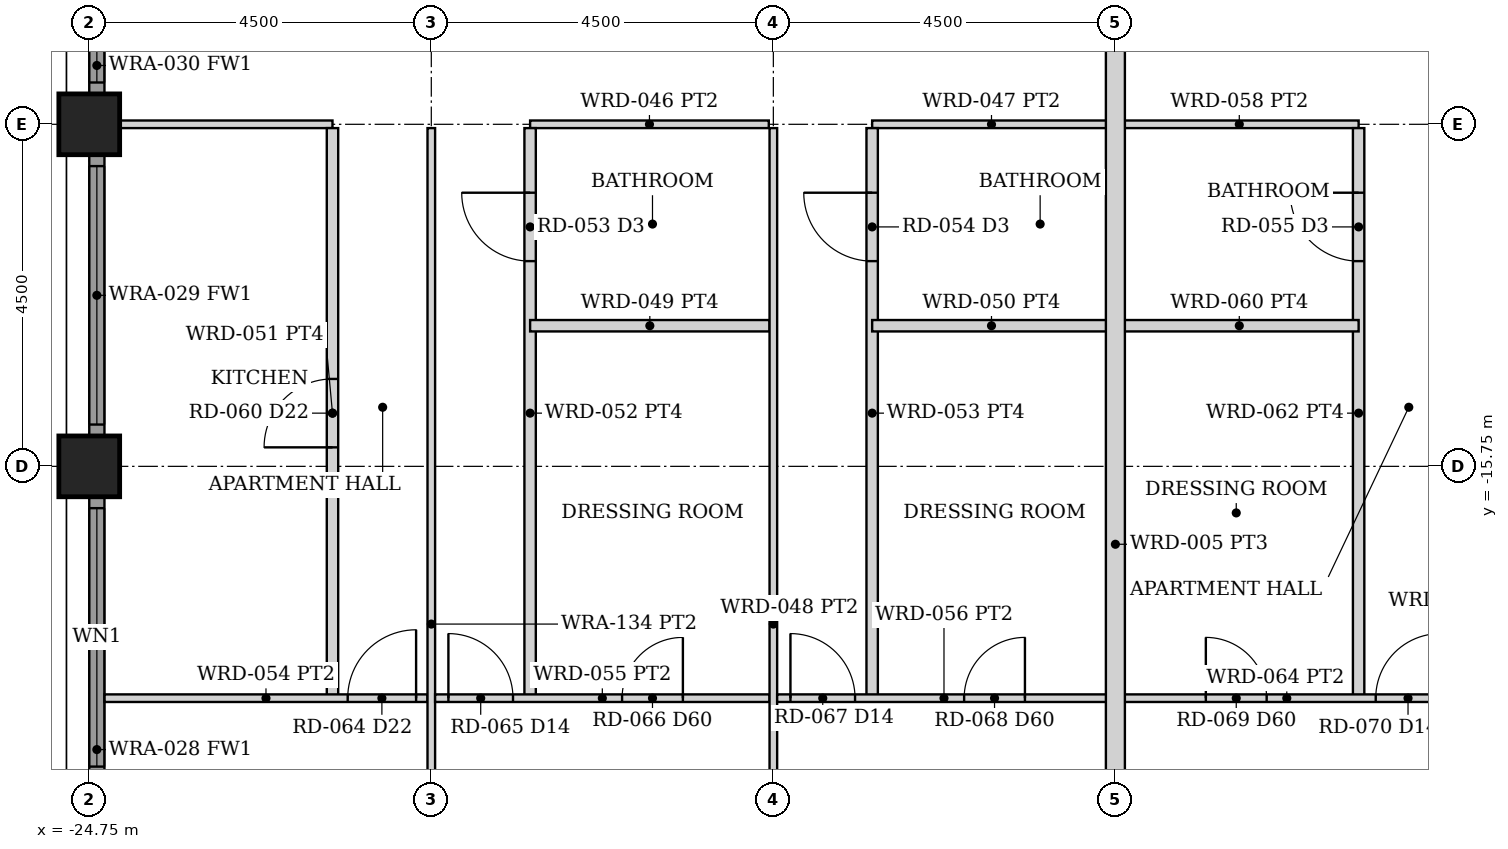
"""IFC4 building model, lengths in metres.
Left out: names, types, materials, properties, quantities, classifications, styles, units other than length and angle.
Written with IfcOpenShell. Run it as: python <this file> out.ifc"""

import sys

from ifc_helpers import new_model, si_unit, direction, frame, frame_2d, origin, origin_2d, place, context, subcontext, project, spatial, rectangle, hollow_rectangle, extrude, element, fill, save


model = new_model("IFC4")
c1 = context("Model", 3, precision=1e-05, world=origin(), true_north=direction((0.0, 1.0)))
c2 = subcontext(c1, "Body", "Model", "MODEL_VIEW")
j1 = project(units=[si_unit("LENGTHUNIT", "METRE"), si_unit("PLANEANGLEUNIT", "RADIAN")], contexts=[c1])
p1 = place(None, origin())
s1 = spatial("IfcSite", under=j1, at=p1, CompositionType="ELEMENT")
p2 = place(p1, origin())
s2 = spatial("IfcBuilding", under=s1, at=p2, CompositionType="ELEMENT")
p3 = place(p2, frame((0.0, 0.0, 58.0)))
s3 = spatial("IfcBuildingStorey", under=s2, at=p3, CompositionType="ELEMENT", Elevation=58.0)
for number, where, z_axis, x_axis in (
    (1, (-24.75, -15.75, 0.0), (0.0, 0.0, 1.0), (1.0, 0.0, 0.0)),
    (2, (-24.75, -11.25, 0.0), (0.0, 0.0, 1.0), (1.0, 0.0, 0.0)),
):
    element("IfcColumn", number, at=place(p3, frame(where, z_axis=z_axis, x_axis=x_axis)), inside=s3, PredefinedType="COLUMN", context=c2, shape_type="SweptSolid", body=[
        extrude(hollow_rectangle(XDim=0.8, YDim=0.8, WallThickness=0.06, at=origin_2d()), origin(), (0.0, 0.0, 1.0), 3.5),
    ])
p4 = place(p3, frame((-24.65, -19.845, 0.0), z_axis=(0.0, 0.0, 1.0), x_axis=(0.0, 1.0, 0.0)))
e3 = element("IfcWall", 3, at=p4, inside=s3, PredefinedType="SOLIDWALL", context=c2, shape_type="SweptSolid", body=[
    extrude(rectangle(XDim=3.69, YDim=0.2, at=frame_2d((1.845, 0.0))), origin(), (0.0, 0.0, 1.0), 2.379),
])
p5 = place(p4, frame((0.145, 0.0, 0.3)))
e4 = element("IfcOpeningElement", 4, at=p5, cuts=e3, PredefinedType="OPENING", context=c2, shape_type="SweptSolid", body=[
    extrude(rectangle(XDim=3.4, YDim=1.929, at=frame_2d((1.7, 0.964))), frame((0.0, 0.11, 0.0), z_axis=(0.0, -1.0, 0.0), x_axis=(1.0, 0.0, 0.0)), (0.0, 0.0, 1.0), 0.22),
])
p6 = place(p3, frame((-24.65, -15.345, 0.0), z_axis=(0.0, 0.0, 1.0), x_axis=(0.0, 1.0, 0.0)))
e5 = element("IfcWall", 5, at=p6, inside=s3, PredefinedType="SOLIDWALL", context=c2, shape_type="SweptSolid", body=[
    extrude(rectangle(XDim=3.69, YDim=0.2, at=frame_2d((1.845, 0.0))), origin(), (0.0, 0.0, 1.0), 2.379),
])
p7 = place(p6, frame((0.145, 0.0, 0.3)))
e6 = element("IfcOpeningElement", 6, at=p7, cuts=e5, PredefinedType="OPENING", context=c2, shape_type="SweptSolid", body=[
    extrude(rectangle(XDim=3.4, YDim=1.929, at=frame_2d((1.7, 0.964))), frame((0.0, 0.11, 0.0), z_axis=(0.0, -1.0, 0.0), x_axis=(1.0, 0.0, 0.0)), (0.0, 0.0, 1.0), 0.22),
])
p8 = place(p3, frame((-24.65, -10.845, 0.0), z_axis=(0.0, 0.0, 1.0), x_axis=(0.0, 1.0, 0.0)))
e7 = element("IfcWall", 7, at=p8, inside=s3, PredefinedType="SOLIDWALL", context=c2, shape_type="SweptSolid", body=[
    extrude(rectangle(XDim=3.69, YDim=0.2, at=frame_2d((1.845, 0.0))), origin(), (0.0, 0.0, 1.0), 2.379),
])
p9 = place(p8, frame((0.145, 0.0, 0.3)))
e8 = element("IfcOpeningElement", 8, at=p9, cuts=e7, PredefinedType="OPENING", context=c2, shape_type="SweptSolid", body=[
    extrude(rectangle(XDim=3.4, YDim=1.929, at=frame_2d((1.7, 0.964))), frame((0.0, 0.11, 0.0), z_axis=(0.0, -1.0, 0.0), x_axis=(1.0, 0.0, 0.0)), (0.0, 0.0, 1.0), 0.22),
])
p10 = place(p3, frame((-24.35, -11.25, 0.0), z_axis=(0.0, 0.0, 1.0), x_axis=(1.0, 0.0, 0.0)))
e9 = element("IfcWall", 9, at=p10, inside=s3, PredefinedType="PARTITIONING", context=c2, shape_type="SweptSolid", body=[
    extrude(rectangle(XDim=2.8, YDim=0.1, at=frame_2d((1.4, 0.0))), origin(), (0.0, 0.0, 1.0), 2.373),
])
p11 = place(p3, frame((-21.55, -18.8, 0.0), z_axis=(0.0, 0.0, 1.0), x_axis=(0.0, 1.0, 0.0)))
e10 = element("IfcWall", 10, at=p11, inside=s3, PredefinedType="PARTITIONING", context=c2, shape_type="SweptSolid", body=[
    extrude(rectangle(XDim=7.5, YDim=0.15, at=frame_2d((3.75, 0.0))), origin(), (0.0, 0.0, 1.0), 2.373),
])
p12 = place(p11, frame((3.3, 0.0, 0.0)))
e11 = element("IfcOpeningElement", 11, at=p12, cuts=e10, PredefinedType="OPENING", context=c2, shape_type="SweptSolid", body=[
    extrude(rectangle(XDim=0.9, YDim=2.1, at=frame_2d((0.45, 1.05))), frame((0.0, 0.085, 0.0), z_axis=(0.0, -1.0, 0.0), x_axis=(1.0, 0.0, 0.0)), (0.0, 0.0, 1.0), 0.17),
])
p13 = place(p3, frame((-24.55, -18.8, 0.0), z_axis=(0.0, 0.0, 1.0), x_axis=(1.0, 0.0, 0.0)))
e12 = element("IfcWall", 12, at=p13, inside=s3, PredefinedType="PARTITIONING", context=c2, shape_type="SweptSolid", body=[
    extrude(rectangle(XDim=4.25, YDim=0.1, at=frame_2d((2.125, 0.0))), origin(), (0.0, 0.0, 1.0), 2.373),
])
p14 = place(p13, frame((3.2, 0.0, 0.0)))
e13 = element("IfcOpeningElement", 13, at=p14, cuts=e12, PredefinedType="OPENING", context=c2, shape_type="SweptSolid", body=[
    extrude(rectangle(XDim=0.9, YDim=2.1, at=frame_2d((0.45, 1.05))), frame((0.0, 0.06, 0.0), z_axis=(0.0, -1.0, 0.0), x_axis=(1.0, 0.0, 0.0)), (0.0, 0.0, 1.0), 0.12),
])
p15 = place(p3, frame((-20.25, -24.35, 0.0), z_axis=(0.0, 0.0, 1.0), x_axis=(0.0, 1.0, 0.0)))
e14 = element("IfcWall", 14, at=p15, inside=s3, PredefinedType="PARTITIONING", context=c2, shape_type="SweptSolid", body=[
    extrude(rectangle(XDim=13.05, YDim=0.1, at=frame_2d((6.525, 0.0))), origin(), (0.0, 0.0, 1.0), 2.373),
])
p16 = place(p3, frame((-18.95, -11.25, 0.0), z_axis=(0.0, 0.0, 1.0), x_axis=(1.0, 0.0, 0.0)))
e15 = element("IfcWall", 15, at=p16, inside=s3, PredefinedType="PARTITIONING", context=c2, shape_type="SweptSolid", body=[
    extrude(rectangle(XDim=3.14, YDim=0.1, at=frame_2d((1.57, 0.0))), origin(), (0.0, 0.0, 1.0), 2.373),
])
p17 = place(p3, frame((-18.95, -18.8, 0.0), z_axis=(0.0, 0.0, 1.0), x_axis=(0.0, 1.0, 0.0)))
e16 = element("IfcWall", 16, at=p17, inside=s3, PredefinedType="PARTITIONING", context=c2, shape_type="SweptSolid", body=[
    extrude(rectangle(XDim=7.5, YDim=0.15, at=frame_2d((3.75, 0.0))), origin(), (0.0, 0.0, 1.0), 2.373),
])
p18 = place(p17, frame((5.75, 0.0, 0.0)))
e17 = element("IfcOpeningElement", 17, at=p18, cuts=e16, PredefinedType="OPENING", context=c2, shape_type="SweptSolid", body=[
    extrude(rectangle(XDim=0.9, YDim=2.1, at=frame_2d((0.45, 1.05))), frame((0.0, 0.085, 0.0), z_axis=(0.0, -1.0, 0.0), x_axis=(1.0, 0.0, 0.0)), (0.0, 0.0, 1.0), 0.17),
])
p19 = place(p3, frame((-20.2, -18.8, 0.0), z_axis=(0.0, 0.0, 1.0), x_axis=(1.0, 0.0, 0.0)))
e18 = element("IfcWall", 18, at=p19, inside=s3, PredefinedType="PARTITIONING", context=c2, shape_type="SweptSolid", body=[
    extrude(rectangle(XDim=4.4, YDim=0.1, at=frame_2d((2.2, 0.0))), origin(), (0.0, 0.0, 1.0), 2.373),
])
p20 = place(p19, frame((0.175, 0.0, 0.0)))
e19 = element("IfcOpeningElement", 19, at=p20, cuts=e18, PredefinedType="OPENING", context=c2, shape_type="SweptSolid", body=[
    extrude(rectangle(XDim=0.85, YDim=2.1, at=frame_2d((0.425, 1.05))), frame((0.0, 0.06, 0.0), z_axis=(0.0, -1.0, 0.0), x_axis=(1.0, 0.0, 0.0)), (0.0, 0.0, 1.0), 0.12),
])
p21 = place(p19, frame((2.46, 0.0, 0.0)))
e20 = element("IfcOpeningElement", 20, at=p21, cuts=e18, PredefinedType="OPENING", context=c2, shape_type="SweptSolid", body=[
    extrude(rectangle(XDim=0.8, YDim=2.1, at=frame_2d((0.4, 1.05))), frame((0.0, 0.06, 0.0), z_axis=(0.0, -1.0, 0.0), x_axis=(1.0, 0.0, 0.0)), (0.0, 0.0, 1.0), 0.12),
])
p22 = place(p3, frame((-18.95, -13.9, 0.0), z_axis=(0.0, 0.0, 1.0), x_axis=(1.0, 0.0, 0.0)))
e21 = element("IfcWall", 21, at=p22, inside=s3, PredefinedType="PARTITIONING", context=c2, shape_type="SweptSolid", body=[
    extrude(rectangle(XDim=3.15, YDim=0.15, at=frame_2d((1.575, 0.0))), origin(), (0.0, 0.0, 1.0), 2.373),
])
p23 = place(p3, frame((-15.75, -24.35, 0.0), z_axis=(0.0, 0.0, 1.0), x_axis=(0.0, 1.0, 0.0)))
e22 = element("IfcWall", 22, at=p23, inside=s3, PredefinedType="PARTITIONING", context=c2, shape_type="SweptSolid", body=[
    extrude(rectangle(XDim=13.05, YDim=0.1, at=frame_2d((6.525, 0.0))), origin(), (0.0, 0.0, 1.0), 2.373),
])
p24 = place(p3, frame((-14.45, -11.25, 0.0), z_axis=(0.0, 0.0, 1.0), x_axis=(1.0, 0.0, 0.0)))
e23 = element("IfcWall", 23, at=p24, inside=s3, PredefinedType="PARTITIONING", context=c2, shape_type="SweptSolid", body=[
    extrude(rectangle(XDim=3.14, YDim=0.1, at=frame_2d((1.57, 0.0))), origin(), (0.0, 0.0, 1.0), 2.373),
])
p25 = place(p3, frame((-14.45, -18.8, 0.0), z_axis=(0.0, 0.0, 1.0), x_axis=(0.0, 1.0, 0.0)))
e24 = element("IfcWall", 24, at=p25, inside=s3, PredefinedType="PARTITIONING", context=c2, shape_type="SweptSolid", body=[
    extrude(rectangle(XDim=7.5, YDim=0.15, at=frame_2d((3.75, 0.0))), origin(), (0.0, 0.0, 1.0), 2.373),
])
p26 = place(p25, frame((5.75, 0.0, 0.0)))
e25 = element("IfcOpeningElement", 25, at=p26, cuts=e24, PredefinedType="OPENING", context=c2, shape_type="SweptSolid", body=[
    extrude(rectangle(XDim=0.9, YDim=2.1, at=frame_2d((0.45, 1.05))), frame((0.0, 0.085, 0.0), z_axis=(0.0, -1.0, 0.0), x_axis=(1.0, 0.0, 0.0)), (0.0, 0.0, 1.0), 0.17),
])
p27 = place(p3, frame((-15.7, -18.8, 0.0), z_axis=(0.0, 0.0, 1.0), x_axis=(1.0, 0.0, 0.0)))
e26 = element("IfcWall", 26, at=p27, inside=s3, PredefinedType="PARTITIONING", context=c2, shape_type="SweptSolid", body=[
    extrude(rectangle(XDim=4.39, YDim=0.1, at=frame_2d((2.195, 0.0))), origin(), (0.0, 0.0, 1.0), 2.373),
])
p28 = place(p27, frame((0.175, 0.0, 0.0)))
e27 = element("IfcOpeningElement", 27, at=p28, cuts=e26, PredefinedType="OPENING", context=c2, shape_type="SweptSolid", body=[
    extrude(rectangle(XDim=0.85, YDim=2.1, at=frame_2d((0.425, 1.05))), frame((0.0, 0.06, 0.0), z_axis=(0.0, -1.0, 0.0), x_axis=(1.0, 0.0, 0.0)), (0.0, 0.0, 1.0), 0.12),
])
p29 = place(p27, frame((2.46, 0.0, 0.0)))
e28 = element("IfcOpeningElement", 28, at=p29, cuts=e26, PredefinedType="OPENING", context=c2, shape_type="SweptSolid", body=[
    extrude(rectangle(XDim=0.8, YDim=2.1, at=frame_2d((0.4, 1.05))), frame((0.0, 0.06, 0.0), z_axis=(0.0, -1.0, 0.0), x_axis=(1.0, 0.0, 0.0)), (0.0, 0.0, 1.0), 0.12),
])
p30 = place(p3, frame((-14.45, -13.9, 0.0), z_axis=(0.0, 0.0, 1.0), x_axis=(1.0, 0.0, 0.0)))
e29 = element("IfcWall", 29, at=p30, inside=s3, PredefinedType="PARTITIONING", context=c2, shape_type="SweptSolid", body=[
    extrude(rectangle(XDim=3.14, YDim=0.15, at=frame_2d((1.57, 0.0))), origin(), (0.0, 0.0, 1.0), 2.373),
])
p31 = place(p3, frame((-11.19, -11.25, 0.0), z_axis=(0.0, 0.0, 1.0), x_axis=(1.0, 0.0, 0.0)))
e30 = element("IfcWall", 30, at=p31, inside=s3, PredefinedType="PARTITIONING", context=c2, shape_type="SweptSolid", body=[
    extrude(rectangle(XDim=3.14, YDim=0.1, at=frame_2d((1.57, 0.0))), origin(), (0.0, 0.0, 1.0), 2.373),
])
p32 = place(p3, frame((-8.05, -18.8, 0.0), z_axis=(0.0, 0.0, 1.0), x_axis=(0.0, 1.0, 0.0)))
e31 = element("IfcWall", 31, at=p32, inside=s3, PredefinedType="PARTITIONING", context=c2, shape_type="SweptSolid", body=[
    extrude(rectangle(XDim=7.5, YDim=0.15, at=frame_2d((3.75, 0.0))), origin(), (0.0, 0.0, 1.0), 2.373),
])
p33 = place(p32, frame((5.75, 0.0, 0.0)))
e32 = element("IfcOpeningElement", 32, at=p33, cuts=e31, PredefinedType="OPENING", context=c2, shape_type="SweptSolid", body=[
    extrude(rectangle(XDim=0.9, YDim=2.1, at=frame_2d((0.45, 1.05))), frame((0.0, 0.085, 0.0), z_axis=(0.0, -1.0, 0.0), x_axis=(1.0, 0.0, 0.0)), (0.0, 0.0, 1.0), 0.17),
])
p34 = place(p3, frame((-11.19, -18.8, 0.0), z_axis=(0.0, 0.0, 1.0), x_axis=(1.0, 0.0, 0.0)))
e33 = element("IfcWall", 33, at=p34, inside=s3, PredefinedType="PARTITIONING", context=c2, shape_type="SweptSolid", body=[
    extrude(rectangle(XDim=4.39, YDim=0.1, at=frame_2d((2.195, 0.0))), origin(), (0.0, 0.0, 1.0), 2.373),
])
p35 = place(p34, frame((3.365, 0.0, 0.0)))
e34 = element("IfcOpeningElement", 34, at=p35, cuts=e33, PredefinedType="OPENING", context=c2, shape_type="SweptSolid", body=[
    extrude(rectangle(XDim=0.85, YDim=2.1, at=frame_2d((0.425, 1.05))), frame((0.0, 0.06, 0.0), z_axis=(0.0, -1.0, 0.0), x_axis=(1.0, 0.0, 0.0)), (0.0, 0.0, 1.0), 0.12),
])
p36 = place(p34, frame((1.13, 0.0, 0.0)))
e35 = element("IfcOpeningElement", 35, at=p36, cuts=e33, PredefinedType="OPENING", context=c2, shape_type="SweptSolid", body=[
    extrude(rectangle(XDim=0.8, YDim=2.1, at=frame_2d((0.4, 1.05))), frame((0.0, 0.06, 0.0), z_axis=(0.0, -1.0, 0.0), x_axis=(1.0, 0.0, 0.0)), (0.0, 0.0, 1.0), 0.12),
])
p37 = place(p3, frame((-11.19, -13.9, 0.0), z_axis=(0.0, 0.0, 1.0), x_axis=(1.0, 0.0, 0.0)))
e36 = element("IfcWall", 36, at=p37, inside=s3, PredefinedType="PARTITIONING", context=c2, shape_type="SweptSolid", body=[
    extrude(rectangle(XDim=3.14, YDim=0.15, at=frame_2d((1.57, 0.0))), origin(), (0.0, 0.0, 1.0), 2.373),
])
p38 = place(p3, frame((-11.25, -24.35, 0.0), z_axis=(0.0, 0.0, 1.0), x_axis=(0.0, 1.0, 0.0)))
e37 = element("IfcWall", 37, at=p38, inside=s3, PredefinedType="PARTITIONING", context=c2, shape_type="SweptSolid", body=[
    extrude(rectangle(XDim=15.15, YDim=0.25, at=frame_2d((7.575, 0.0))), origin(), (0.0, 0.0, 1.0), 2.373),
])
p39 = place(p5, origin())
e38 = element("IfcWindow", 38, at=p39, inside=s3, PartitioningType="SINGLE_PANEL", PredefinedType="WINDOW", context=c2, shape_type="SweptSolid", body=[
    extrude(rectangle(XDim=3.4, YDim=1.929, at=frame_2d((1.7, 0.964))), frame((0.0, 0.03, 0.0), z_axis=(0.0, -1.0, 0.0), x_axis=(1.0, 0.0, 0.0)), (0.0, 0.0, 1.0), 0.06),
])
fill(e4, e38)
p40 = place(p7, origin())
e39 = element("IfcWindow", 39, at=p40, inside=s3, PartitioningType="SINGLE_PANEL", PredefinedType="WINDOW", context=c2, shape_type="SweptSolid", body=[
    extrude(rectangle(XDim=3.4, YDim=1.929, at=frame_2d((1.7, 0.964))), frame((0.0, 0.03, 0.0), z_axis=(0.0, -1.0, 0.0), x_axis=(1.0, 0.0, 0.0)), (0.0, 0.0, 1.0), 0.06),
])
fill(e6, e39)
p41 = place(p9, origin())
e40 = element("IfcWindow", 40, at=p41, inside=s3, PartitioningType="SINGLE_PANEL", PredefinedType="WINDOW", context=c2, shape_type="SweptSolid", body=[
    extrude(rectangle(XDim=3.4, YDim=1.929, at=frame_2d((1.7, 0.964))), frame((0.0, 0.03, 0.0), z_axis=(0.0, -1.0, 0.0), x_axis=(1.0, 0.0, 0.0)), (0.0, 0.0, 1.0), 0.06),
])
fill(e8, e40)
p42 = place(p12, origin())
e41 = element("IfcDoor", 41, at=p42, inside=s3, OperationType="SINGLE_SWING_LEFT", PredefinedType="DOOR", context=c2, shape_type="SweptSolid", body=[
    extrude(rectangle(XDim=0.9, YDim=2.1, at=frame_2d((0.45, 1.05))), frame((0.0, 0.025, 0.0), z_axis=(0.0, -1.0, 0.0), x_axis=(1.0, 0.0, 0.0)), (0.0, 0.0, 1.0), 0.05),
])
fill(e11, e41)
p43 = place(p14, origin())
e42 = element("IfcDoor", 42, at=p43, inside=s3, OperationType="SINGLE_SWING_RIGHT", PredefinedType="DOOR", context=c2, shape_type="SweptSolid", body=[
    extrude(rectangle(XDim=0.9, YDim=2.1, at=frame_2d((0.45, 1.05))), frame((0.0, 0.025, 0.0), z_axis=(0.0, -1.0, 0.0), x_axis=(1.0, 0.0, 0.0)), (0.0, 0.0, 1.0), 0.05),
])
fill(e13, e42)
p44 = place(p20, origin())
e43 = element("IfcDoor", 43, at=p44, inside=s3, OperationType="SINGLE_SWING_LEFT", PredefinedType="DOOR", context=c2, shape_type="SweptSolid", body=[
    extrude(rectangle(XDim=0.85, YDim=2.1, at=frame_2d((0.425, 1.05))), frame((0.0, 0.025, 0.0), z_axis=(0.0, -1.0, 0.0), x_axis=(1.0, 0.0, 0.0)), (0.0, 0.0, 1.0), 0.05),
])
fill(e19, e43)
p45 = place(p18, origin())
e44 = element("IfcDoor", 44, at=p45, inside=s3, OperationType="SINGLE_SWING_RIGHT", PredefinedType="DOOR", context=c2, shape_type="SweptSolid", body=[
    extrude(rectangle(XDim=0.9, YDim=2.1, at=frame_2d((0.45, 1.05))), frame((0.0, 0.025, 0.0), z_axis=(0.0, -1.0, 0.0), x_axis=(1.0, 0.0, 0.0)), (0.0, 0.0, 1.0), 0.05),
])
fill(e17, e44)
p46 = place(p21, origin())
e45 = element("IfcDoor", 45, at=p46, inside=s3, OperationType="SINGLE_SWING_RIGHT", PredefinedType="DOOR", context=c2, shape_type="SweptSolid", body=[
    extrude(rectangle(XDim=0.8, YDim=2.1, at=frame_2d((0.4, 1.05))), frame((0.0, 0.025, 0.0), z_axis=(0.0, -1.0, 0.0), x_axis=(1.0, 0.0, 0.0)), (0.0, 0.0, 1.0), 0.05),
])
fill(e20, e45)
p47 = place(p28, origin())
e46 = element("IfcDoor", 46, at=p47, inside=s3, OperationType="SINGLE_SWING_LEFT", PredefinedType="DOOR", context=c2, shape_type="SweptSolid", body=[
    extrude(rectangle(XDim=0.85, YDim=2.1, at=frame_2d((0.425, 1.05))), frame((0.0, 0.025, 0.0), z_axis=(0.0, -1.0, 0.0), x_axis=(1.0, 0.0, 0.0)), (0.0, 0.0, 1.0), 0.05),
])
fill(e27, e46)
p48 = place(p26, origin())
e47 = element("IfcDoor", 47, at=p48, inside=s3, OperationType="SINGLE_SWING_RIGHT", PredefinedType="DOOR", context=c2, shape_type="SweptSolid", body=[
    extrude(rectangle(XDim=0.9, YDim=2.1, at=frame_2d((0.45, 1.05))), frame((0.0, 0.025, 0.0), z_axis=(0.0, -1.0, 0.0), x_axis=(1.0, 0.0, 0.0)), (0.0, 0.0, 1.0), 0.05),
])
fill(e25, e47)
p49 = place(p29, origin())
e48 = element("IfcDoor", 48, at=p49, inside=s3, OperationType="SINGLE_SWING_RIGHT", PredefinedType="DOOR", context=c2, shape_type="SweptSolid", body=[
    extrude(rectangle(XDim=0.8, YDim=2.1, at=frame_2d((0.4, 1.05))), frame((0.0, 0.025, 0.0), z_axis=(0.0, -1.0, 0.0), x_axis=(1.0, 0.0, 0.0)), (0.0, 0.0, 1.0), 0.05),
])
fill(e28, e48)
p50 = place(p35, origin())
e49 = element("IfcDoor", 49, at=p50, inside=s3, OperationType="SINGLE_SWING_RIGHT", PredefinedType="DOOR", context=c2, shape_type="SweptSolid", body=[
    extrude(rectangle(XDim=0.85, YDim=2.1, at=frame_2d((0.425, 1.05))), frame((0.0, 0.025, 0.0), z_axis=(0.0, -1.0, 0.0), x_axis=(1.0, 0.0, 0.0)), (0.0, 0.0, 1.0), 0.05),
])
fill(e34, e49)
p51 = place(p33, origin())
e50 = element("IfcDoor", 50, at=p51, inside=s3, OperationType="SINGLE_SWING_RIGHT", PredefinedType="DOOR", context=c2, shape_type="SweptSolid", body=[
    extrude(rectangle(XDim=0.9, YDim=2.1, at=frame_2d((0.45, 1.05))), frame((0.0, 0.025, 0.0), z_axis=(0.0, -1.0, 0.0), x_axis=(1.0, 0.0, 0.0)), (0.0, 0.0, 1.0), 0.05),
])
fill(e32, e50)
p52 = place(p36, origin())
e51 = element("IfcDoor", 51, at=p52, inside=s3, OperationType="SINGLE_SWING_LEFT", PredefinedType="DOOR", context=c2, shape_type="SweptSolid", body=[
    extrude(rectangle(XDim=0.8, YDim=2.1, at=frame_2d((0.4, 1.05))), frame((0.0, 0.025, 0.0), z_axis=(0.0, -1.0, 0.0), x_axis=(1.0, 0.0, 0.0)), (0.0, 0.0, 1.0), 0.05),
])
fill(e35, e51)
save(model, sys.argv[1])
